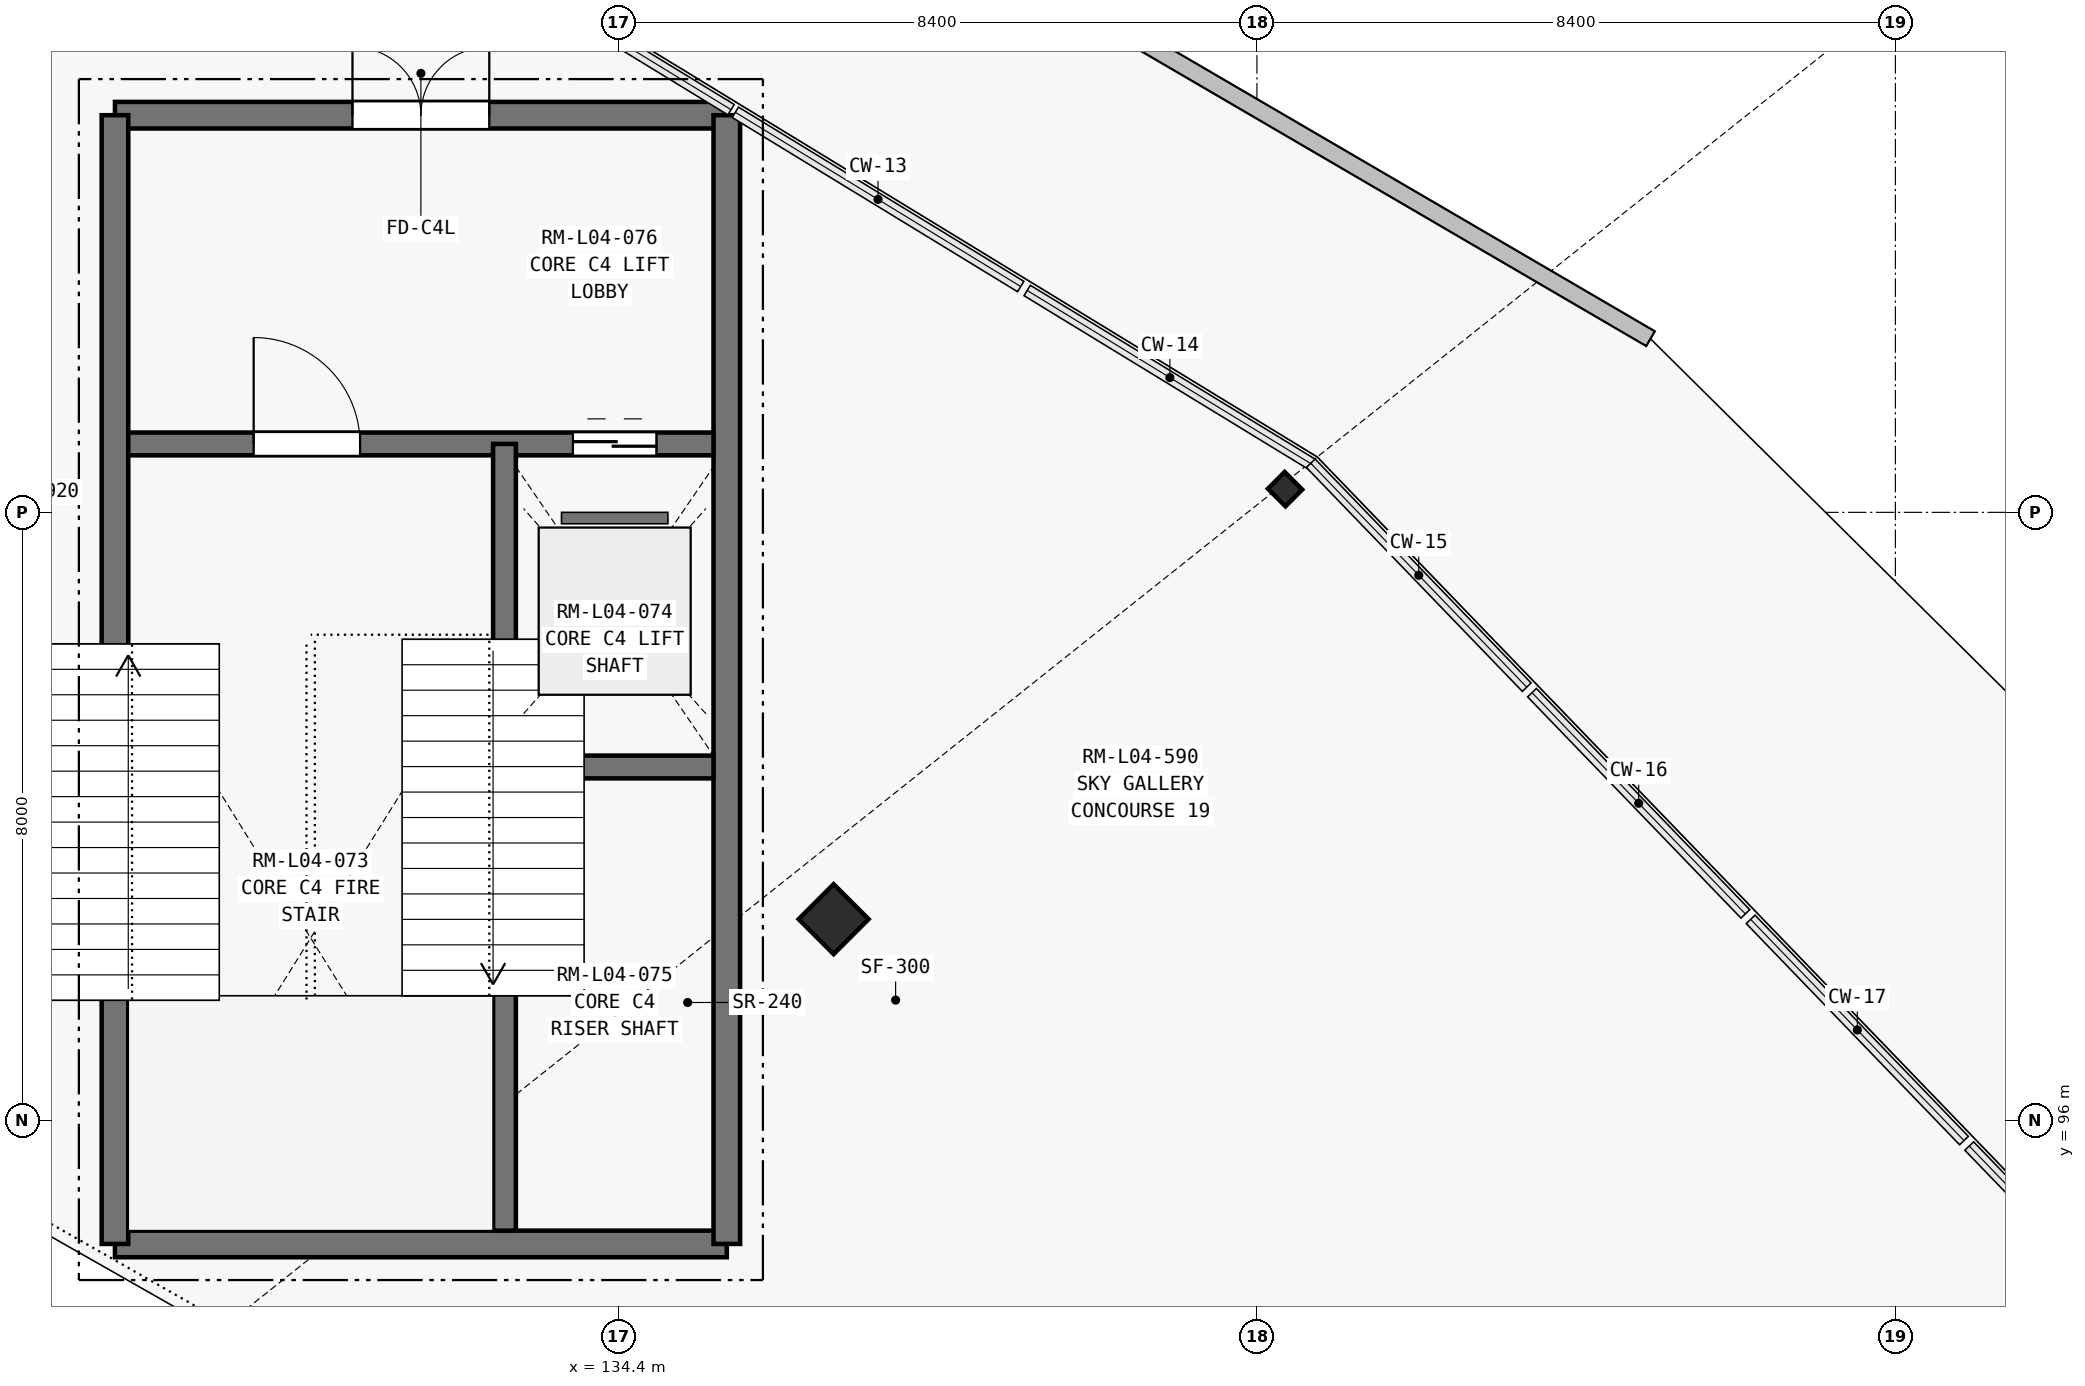
"""IFC4 building model, lengths in metres.
Left out: names, types, materials, properties, quantities, classifications, styles, units other than length and angle.
Written with IfcOpenShell. Run it as: python <this file> out.ifc"""

import sys

from ifc_helpers import new_model, si_unit, direction, frame, frame_2d, origin, origin_2d, place, context, subcontext, project, spatial, rectangle, i_section, extrude, element, fill, save


model = new_model("IFC4")
c1 = context("Model", 3, precision=1e-05, world=origin(), true_north=direction((0.0, 1.0)))
c2 = subcontext(c1, "Body", "Model", "MODEL_VIEW")
j1 = project(units=[si_unit("LENGTHUNIT", "METRE"), si_unit("PLANEANGLEUNIT", "RADIAN")], contexts=[c1])
p1 = place(None, origin())
s1 = spatial("IfcSite", under=j1, at=p1, CompositionType="ELEMENT")
p2 = place(p1, origin())
s2 = spatial("IfcBuilding", under=s1, at=p2, CompositionType="ELEMENT")
p3 = place(p2, frame((0.0, 0.0, 18.9)))
s3 = spatial("IfcBuildingStorey", under=s2, at=p3, CompositionType="ELEMENT", Elevation=18.9)
p4 = place(p3, frame((137.231, 98.648, 0.0), z_axis=(0.0, 0.0, 1.0), x_axis=(0.707106781187, 0.707106781187, 0.0)))
e1 = element("IfcColumn", 1, at=p4, inside=s3, PredefinedType="COLUMN", context=c2, shape_type="SweptSolid", body=[
    extrude(rectangle(XDim=0.65, YDim=0.65, at=origin_2d()), origin(), (0.0, 0.0, 1.0), 4.5),
])
p5 = place(p3, frame((143.17, 104.305, 0.0), z_axis=(0.0, 0.0, 1.0), x_axis=(0.707106781187, 0.707106781187, 0.0)))
e2 = element("IfcColumn", 2, at=p5, inside=s3, PredefinedType="COLUMN", context=c2, shape_type="SweptSolid", body=[
    extrude(i_section(OverallWidth=0.311, OverallDepth=0.327, WebThickness=0.016, FlangeThickness=0.025, at=origin_2d()), origin(), (0.0, 0.0, 1.0), 4.5),
])
p6 = place(p3, frame((131.7, 115.788, 0.0), z_axis=(0.0, 0.0, 1.0), x_axis=(0.863603626938, -0.504171375169, 0.0)))
e3 = element("IfcWall", 3, at=p6, inside=s3, PredefinedType="PARAPET", context=c2, shape_type="SweptSolid", body=[
    extrude(rectangle(XDim=18.85, YDim=0.225, at=frame_2d((9.425, 0.0))), origin(), (0.0, 0.0, 1.0), 0.95),
])
p7 = place(p3, frame((127.775, 94.375, 0.0), z_axis=(0.0, 0.0, 1.0), x_axis=(1.0, 0.0, 0.0)))
e4 = element("IfcWall", 4, at=p7, inside=s3, PredefinedType="SHEAR", context=c2, shape_type="SweptSolid", body=[
    extrude(rectangle(XDim=8.05, YDim=0.35, at=frame_2d((4.025, 0.0))), origin(), (0.0, 0.0, 1.0), 4.5),
])
p8 = place(p3, frame((127.775, 109.225, 0.0), z_axis=(0.0, 0.0, 1.0), x_axis=(1.0, 0.0, 0.0)))
e5 = element("IfcWall", 5, at=p8, inside=s3, PredefinedType="SHEAR", context=c2, shape_type="SweptSolid", body=[
    extrude(rectangle(XDim=8.05, YDim=0.35, at=frame_2d((4.025, 0.0))), origin(), (0.0, 0.0, 1.0), 4.5),
])
p9 = place(p8, frame((3.125, 0.0, 0.0)))
e6 = element("IfcOpeningElement", 6, at=p9, cuts=e5, PredefinedType="OPENING", context=c2, shape_type="SweptSolid", body=[
    extrude(rectangle(XDim=1.8, YDim=2.25, at=frame_2d((0.9, 1.125))), frame((0.0, 0.185, 0.0), z_axis=(0.0, -1.0, 0.0), x_axis=(1.0, 0.0, 0.0)), (0.0, 0.0, 1.0), 0.37),
])
for number, where, z_axis, x_axis in (
    (7, (127.775, 94.375, 0.0), (0.0, 0.0, 1.0), (0.0, 1.0, 0.0)),
    (8, (135.825, 94.375, 0.0), (0.0, 0.0, 1.0), (0.0, 1.0, 0.0)),
):
    element("IfcWall", number, at=place(p3, frame(where, z_axis=z_axis, x_axis=x_axis)), inside=s3, PredefinedType="SHEAR", context=c2, shape_type="SweptSolid", body=[
        extrude(rectangle(XDim=14.85, YDim=0.35, at=frame_2d((7.425, 0.0))), origin(), (0.0, 0.0, 1.0), 4.5),
    ])
p10 = place(p3, frame((127.95, 104.9, 0.0), z_axis=(0.0, 0.0, 1.0), x_axis=(1.0, 0.0, 0.0)))
e9 = element("IfcWall", 9, at=p10, inside=s3, PredefinedType="SHEAR", context=c2, shape_type="SweptSolid", body=[
    extrude(rectangle(XDim=7.7, YDim=0.3, at=frame_2d((3.85, 0.0))), origin(), (0.0, 0.0, 1.0), 4.5),
])
p11 = place(p10, frame((1.65, 0.0, 0.0)))
e10 = element("IfcOpeningElement", 10, at=p11, cuts=e9, PredefinedType="OPENING", context=c2, shape_type="SweptSolid", body=[
    extrude(rectangle(XDim=1.4, YDim=2.2, at=frame_2d((0.7, 1.1))), frame((0.0, 0.16, 0.0), z_axis=(0.0, -1.0, 0.0), x_axis=(1.0, 0.0, 0.0)), (0.0, 0.0, 1.0), 0.32),
])
p12 = place(p10, frame((5.85, 0.0, 0.0)))
e11 = element("IfcOpeningElement", 11, at=p12, cuts=e9, PredefinedType="OPENING", context=c2, shape_type="SweptSolid", body=[
    extrude(rectangle(XDim=1.1, YDim=2.2, at=frame_2d((0.55, 1.1))), frame((0.0, 0.16, 0.0), z_axis=(0.0, -1.0, 0.0), x_axis=(1.0, 0.0, 0.0)), (0.0, 0.0, 1.0), 0.32),
])
p13 = place(p3, frame((132.9, 94.55, 0.0), z_axis=(0.0, 0.0, 1.0), x_axis=(0.0, 1.0, 0.0)))
e12 = element("IfcWall", 12, at=p13, inside=s3, PredefinedType="SHEAR", context=c2, shape_type="SweptSolid", body=[
    extrude(rectangle(XDim=10.35, YDim=0.3, at=frame_2d((5.175, 0.0))), origin(), (0.0, 0.0, 1.0), 4.5),
])
p14 = place(p3, frame((133.05, 100.65, 0.0), z_axis=(0.0, 0.0, 1.0), x_axis=(1.0, 0.0, 0.0)))
e13 = element("IfcWall", 13, at=p14, inside=s3, PredefinedType="SHEAR", context=c2, shape_type="SweptSolid", body=[
    extrude(rectangle(XDim=2.6, YDim=0.3, at=frame_2d((1.3, 0.0))), origin(), (0.0, 0.0, 1.0), 4.5),
])
p15 = place(p9, origin())
e14 = element("IfcDoor", 14, at=p15, inside=s3, OperationType="DOUBLE_DOOR_SINGLE_SWING", PredefinedType="DOOR", context=c2, shape_type="SweptSolid", body=[
    extrude(rectangle(XDim=1.8, YDim=2.25, at=frame_2d((0.9, 1.125))), frame((0.0, 0.025, 0.0), z_axis=(0.0, -1.0, 0.0), x_axis=(1.0, 0.0, 0.0)), (0.0, 0.0, 1.0), 0.05),
])
fill(e6, e14)
p16 = place(p11, origin())
e15 = element("IfcDoor", 15, at=p16, inside=s3, OperationType="SINGLE_SWING_LEFT", PredefinedType="DOOR", context=c2, shape_type="SweptSolid", body=[
    extrude(rectangle(XDim=1.4, YDim=2.2, at=frame_2d((0.7, 1.1))), frame((0.0, 0.025, 0.0), z_axis=(0.0, -1.0, 0.0), x_axis=(1.0, 0.0, 0.0)), (0.0, 0.0, 1.0), 0.05),
])
fill(e10, e15)
p17 = place(p12, origin())
e16 = element("IfcDoor", 16, at=p17, inside=s3, OperationType="SLIDING_TO_LEFT", PredefinedType="DOOR", context=c2, shape_type="SweptSolid", body=[
    extrude(rectangle(XDim=1.1, YDim=2.2, at=frame_2d((0.55, 1.1))), frame((0.0, 0.025, 0.0), z_axis=(0.0, -1.0, 0.0), x_axis=(1.0, 0.0, 0.0)), (0.0, 0.0, 1.0), 0.05),
])
fill(e11, e16)
save(model, sys.argv[1])
